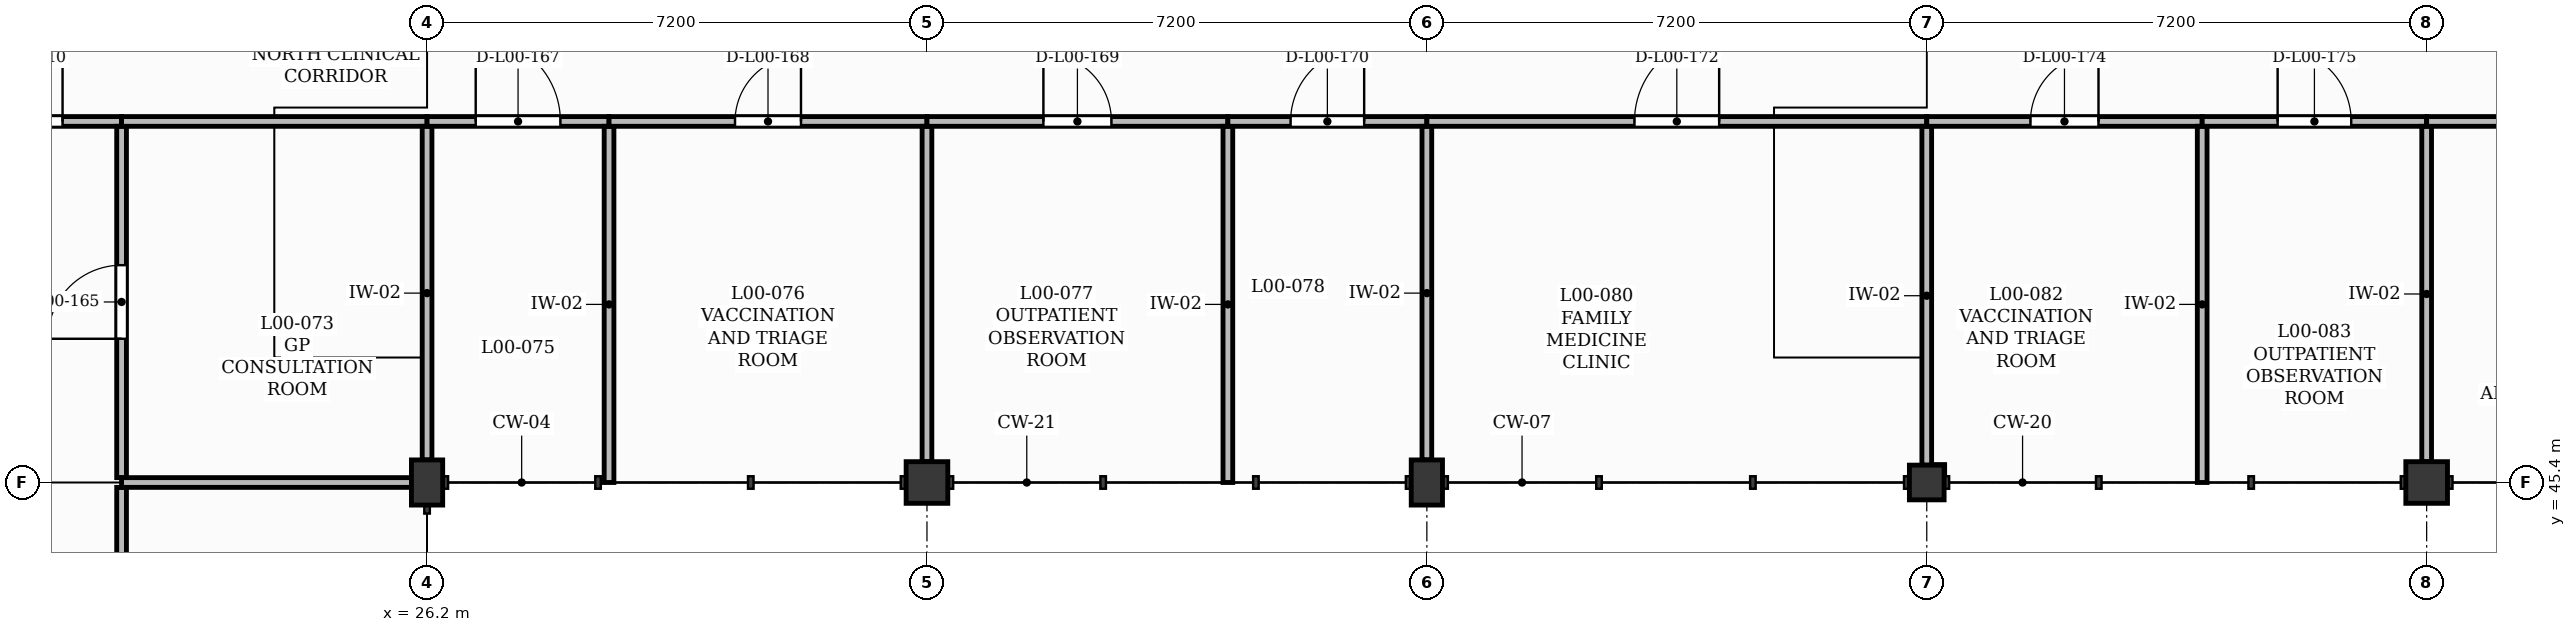
"""IFC4 building model, lengths in metres.
Left out: names, types, materials, properties, quantities, classifications, styles, units other than length and angle.
Written with IfcOpenShell. Run it as: python <this file> out.ifc"""

import sys

from ifc_helpers import new_model, si_unit, direction, frame, frame_2d, origin, origin_2d, place, context, subcontext, project, spatial, rectangle, extrude, element, fill, save


model = new_model("IFC4")
c1 = context("Model", 3, precision=1e-05, world=origin(), true_north=direction((0.0, 1.0)))
c2 = subcontext(c1, "Body", "Model", "MODEL_VIEW")
j1 = project(units=[si_unit("LENGTHUNIT", "METRE"), si_unit("PLANEANGLEUNIT", "RADIAN")], contexts=[c1])
p1 = place(None, origin())
s1 = spatial("IfcSite", under=j1, at=p1, CompositionType="ELEMENT")
p2 = place(p1, origin())
s2 = spatial("IfcBuilding", under=s1, at=p2, CompositionType="ELEMENT")
p3 = place(p2, origin())
s3 = spatial("IfcBuildingStorey", under=s2, at=p3, CompositionType="ELEMENT", Elevation=0.0)
p4 = place(p3, frame((26.2, 45.4, 0.0), z_axis=(0.0, 0.0, 1.0), x_axis=(1.0, 0.0, 0.0)))
e1 = element("IfcColumn", 1, at=p4, inside=s3, PredefinedType="COLUMN", context=c2, shape_type="SweptSolid", body=[
    extrude(rectangle(XDim=0.45, YDim=0.65, at=origin_2d()), origin(), (0.0, 0.0, 1.0), 4.2),
])
p5 = place(p3, frame((33.4, 45.4, 0.0), z_axis=(0.0, 0.0, 1.0), x_axis=(1.0, 0.0, 0.0)))
e2 = element("IfcColumn", 2, at=p5, inside=s3, PredefinedType="COLUMN", context=c2, shape_type="SweptSolid", body=[
    extrude(rectangle(XDim=0.6, YDim=0.6, at=origin_2d()), origin(), (0.0, 0.0, 1.0), 4.2),
])
p6 = place(p3, frame((40.6, 45.4, 0.0), z_axis=(0.0, 0.0, 1.0), x_axis=(1.0, 0.0, 0.0)))
e3 = element("IfcColumn", 3, at=p6, inside=s3, PredefinedType="COLUMN", context=c2, shape_type="SweptSolid", body=[
    extrude(rectangle(XDim=0.45, YDim=0.65, at=origin_2d()), origin(), (0.0, 0.0, 1.0), 4.2),
])
p7 = place(p3, frame((47.8, 45.4, 0.0), z_axis=(0.0, 0.0, 1.0), x_axis=(1.0, 0.0, 0.0)))
e4 = element("IfcColumn", 4, at=p7, inside=s3, PredefinedType="COLUMN", context=c2, shape_type="SweptSolid", body=[
    extrude(rectangle(XDim=0.5, YDim=0.5, at=origin_2d()), origin(), (0.0, 0.0, 1.0), 4.2),
])
p8 = place(p3, frame((55.0, 45.4, 0.0), z_axis=(0.0, 0.0, 1.0), x_axis=(1.0, 0.0, 0.0)))
e5 = element("IfcColumn", 5, at=p8, inside=s3, PredefinedType="COLUMN", context=c2, shape_type="SweptSolid", body=[
    extrude(rectangle(XDim=0.6, YDim=0.6, at=origin_2d()), origin(), (0.0, 0.0, 1.0), 4.2),
])
p9 = place(p3, frame((19.0, 50.6, 0.0), z_axis=(0.0, 0.0, 1.0), x_axis=(1.0, 0.0, 0.0)))
e6 = element("IfcWall", 6, at=p9, inside=s3, PredefinedType="PARTITIONING", context=c2, shape_type="SweptSolid", body=[
    extrude(rectangle(XDim=2.8, YDim=0.14, at=frame_2d((1.4, 0.0))), origin(), (0.0, 0.0, 1.0), 4.18),
])
p10 = place(p9, frame((0.85, 0.0, 0.0)))
e7 = element("IfcOpeningElement", 7, at=p10, cuts=e6, PredefinedType="OPENING", context=c2, shape_type="SweptSolid", body=[
    extrude(rectangle(XDim=1.1, YDim=2.1, at=frame_2d((0.55, 1.05))), frame((0.0, 0.08, 0.0), z_axis=(0.0, -1.0, 0.0), x_axis=(1.0, 0.0, 0.0)), (0.0, 0.0, 1.0), 0.16),
])
p11 = place(p3, frame((21.8, 36.87, 0.0), z_axis=(0.0, 0.0, 1.0), x_axis=(0.0, 1.0, 0.0)))
e8 = element("IfcWall", 8, at=p11, inside=s3, PredefinedType="PARTITIONING", context=c2, shape_type="SweptSolid", body=[
    extrude(rectangle(XDim=8.46, YDim=0.14, at=frame_2d((4.23, 0.0))), origin(), (0.0, 0.0, 1.0), 4.18),
])
p12 = place(p11, frame((3.65, 0.0, 0.0)))
e9 = element("IfcOpeningElement", 9, at=p12, cuts=e8, PredefinedType="OPENING", context=c2, shape_type="SweptSolid", body=[
    extrude(rectangle(XDim=1.16, YDim=2.1, at=frame_2d((0.58, 1.05))), frame((0.0, 0.08, 0.0), z_axis=(0.0, -1.0, 0.0), x_axis=(1.0, 0.0, 0.0)), (0.0, 0.0, 1.0), 0.16),
])
p13 = place(p3, frame((21.8, 45.47, 0.0), z_axis=(0.0, 0.0, 1.0), x_axis=(0.0, 1.0, 0.0)))
e10 = element("IfcWall", 10, at=p13, inside=s3, PredefinedType="PARTITIONING", context=c2, shape_type="SweptSolid", body=[
    extrude(rectangle(XDim=5.06, YDim=0.14, at=frame_2d((2.53, 0.0))), origin(), (0.0, 0.0, 1.0), 4.18),
])
p14 = place(p13, frame((2.0, 0.0, 0.0)))
e11 = element("IfcOpeningElement", 11, at=p14, cuts=e10, PredefinedType="OPENING", context=c2, shape_type="SweptSolid", body=[
    extrude(rectangle(XDim=1.06, YDim=2.15, at=frame_2d((0.53, 1.075))), frame((0.0, 0.08, 0.0), z_axis=(0.0, -1.0, 0.0), x_axis=(1.0, 0.0, 0.0)), (0.0, 0.0, 1.0), 0.16),
])
p15 = place(p3, frame((21.8, 45.4, 0.0), z_axis=(0.0, 0.0, 1.0), x_axis=(1.0, 0.0, 0.0)))
e12 = element("IfcWall", 12, at=p15, inside=s3, PredefinedType="PARTITIONING", context=c2, shape_type="SweptSolid", body=[
    extrude(rectangle(XDim=4.175, YDim=0.14, at=frame_2d((2.087, 0.0))), origin(), (0.0, 0.0, 1.0), 3.25),
])
p16 = place(p3, frame((21.8, 50.6, 0.0), z_axis=(0.0, 0.0, 1.0), x_axis=(1.0, 0.0, 0.0)))
e13 = element("IfcWall", 13, at=p16, inside=s3, PredefinedType="PARTITIONING", context=c2, shape_type="SweptSolid", body=[
    extrude(rectangle(XDim=4.4, YDim=0.14, at=frame_2d((2.2, 0.0))), origin(), (0.0, 0.0, 1.0), 4.18),
])
p17 = place(p3, frame((26.2, 45.725, 0.0), z_axis=(0.0, 0.0, 1.0), x_axis=(0.0, 1.0, 0.0)))
e14 = element("IfcWall", 14, at=p17, inside=s3, PredefinedType="PARTITIONING", context=c2, shape_type="SweptSolid", body=[
    extrude(rectangle(XDim=4.805, YDim=0.14, at=frame_2d((2.402, 0.0))), origin(), (0.0, 0.0, 1.0), 3.5),
])
p18 = place(p3, frame((26.2, 50.6, 0.0), z_axis=(0.0, 0.0, 1.0), x_axis=(1.0, 0.0, 0.0)))
e15 = element("IfcWall", 15, at=p18, inside=s3, PredefinedType="PARTITIONING", context=c2, shape_type="SweptSolid", body=[
    extrude(rectangle(XDim=2.621, YDim=0.14, at=frame_2d((1.311, 0.0))), origin(), (0.0, 0.0, 1.0), 4.18),
])
p19 = place(p18, frame((0.7, 0.0, 0.0)))
e16 = element("IfcOpeningElement", 16, at=p19, cuts=e15, PredefinedType="OPENING", context=c2, shape_type="SweptSolid", body=[
    extrude(rectangle(XDim=1.22, YDim=2.1, at=frame_2d((0.61, 1.05))), frame((0.0, 0.08, 0.0), z_axis=(0.0, -1.0, 0.0), x_axis=(1.0, 0.0, 0.0)), (0.0, 0.0, 1.0), 0.16),
])
p20 = place(p3, frame((28.821, 45.4, 0.0), z_axis=(0.0, 0.0, 1.0), x_axis=(0.0, 1.0, 0.0)))
e17 = element("IfcWall", 17, at=p20, inside=s3, PredefinedType="PARTITIONING", context=c2, shape_type="SweptSolid", body=[
    extrude(rectangle(XDim=5.13, YDim=0.14, at=frame_2d((2.565, 0.0))), origin(), (0.0, 0.0, 1.0), 4.18),
])
p21 = place(p3, frame((28.821, 50.6, 0.0), z_axis=(0.0, 0.0, 1.0), x_axis=(1.0, 0.0, 0.0)))
e18 = element("IfcWall", 18, at=p21, inside=s3, PredefinedType="PARTITIONING", context=c2, shape_type="SweptSolid", body=[
    extrude(rectangle(XDim=4.579, YDim=0.14, at=frame_2d((2.29, 0.0))), origin(), (0.0, 0.0, 1.0), 4.18),
])
p22 = place(p21, frame((1.814, 0.0, 0.0)))
e19 = element("IfcOpeningElement", 19, at=p22, cuts=e18, PredefinedType="OPENING", context=c2, shape_type="SweptSolid", body=[
    extrude(rectangle(XDim=0.95, YDim=2.1, at=frame_2d((0.475, 1.05))), frame((0.0, 0.08, 0.0), z_axis=(0.0, -1.0, 0.0), x_axis=(1.0, 0.0, 0.0)), (0.0, 0.0, 1.0), 0.16),
])
p23 = place(p3, frame((33.4, 45.7, 0.0), z_axis=(0.0, 0.0, 1.0), x_axis=(0.0, 1.0, 0.0)))
e20 = element("IfcWall", 20, at=p23, inside=s3, PredefinedType="PARTITIONING", context=c2, shape_type="SweptSolid", body=[
    extrude(rectangle(XDim=4.83, YDim=0.14, at=frame_2d((2.415, 0.0))), origin(), (0.0, 0.0, 1.0), 3.5),
])
p24 = place(p3, frame((33.4, 50.6, 0.0), z_axis=(0.0, 0.0, 1.0), x_axis=(1.0, 0.0, 0.0)))
e21 = element("IfcWall", 21, at=p24, inside=s3, PredefinedType="PARTITIONING", context=c2, shape_type="SweptSolid", body=[
    extrude(rectangle(XDim=4.334, YDim=0.14, at=frame_2d((2.167, 0.0))), origin(), (0.0, 0.0, 1.0), 4.18),
])
p25 = place(p24, frame((1.677, 0.0, 0.0)))
e22 = element("IfcOpeningElement", 22, at=p25, cuts=e21, PredefinedType="OPENING", context=c2, shape_type="SweptSolid", body=[
    extrude(rectangle(XDim=0.98, YDim=2.15, at=frame_2d((0.49, 1.075))), frame((0.0, 0.08, 0.0), z_axis=(0.0, -1.0, 0.0), x_axis=(1.0, 0.0, 0.0)), (0.0, 0.0, 1.0), 0.16),
])
p26 = place(p3, frame((37.734, 45.4, 0.0), z_axis=(0.0, 0.0, 1.0), x_axis=(0.0, 1.0, 0.0)))
e23 = element("IfcWall", 23, at=p26, inside=s3, PredefinedType="PARTITIONING", context=c2, shape_type="SweptSolid", body=[
    extrude(rectangle(XDim=5.13, YDim=0.14, at=frame_2d((2.565, 0.0))), origin(), (0.0, 0.0, 1.0), 4.18),
])
p27 = place(p3, frame((37.734, 50.6, 0.0), z_axis=(0.0, 0.0, 1.0), x_axis=(1.0, 0.0, 0.0)))
e24 = element("IfcWall", 24, at=p27, inside=s3, PredefinedType="PARTITIONING", context=c2, shape_type="SweptSolid", body=[
    extrude(rectangle(XDim=2.866, YDim=0.14, at=frame_2d((1.433, 0.0))), origin(), (0.0, 0.0, 1.0), 4.18),
])
p28 = place(p27, frame((0.903, 0.0, 0.0)))
e25 = element("IfcOpeningElement", 25, at=p28, cuts=e24, PredefinedType="OPENING", context=c2, shape_type="SweptSolid", body=[
    extrude(rectangle(XDim=1.06, YDim=2.15, at=frame_2d((0.53, 1.075))), frame((0.0, 0.08, 0.0), z_axis=(0.0, -1.0, 0.0), x_axis=(1.0, 0.0, 0.0)), (0.0, 0.0, 1.0), 0.16),
])
p29 = place(p3, frame((40.6, 45.725, 0.0), z_axis=(0.0, 0.0, 1.0), x_axis=(0.0, 1.0, 0.0)))
e26 = element("IfcWall", 26, at=p29, inside=s3, PredefinedType="PARTITIONING", context=c2, shape_type="SweptSolid", body=[
    extrude(rectangle(XDim=4.805, YDim=0.14, at=frame_2d((2.402, 0.0))), origin(), (0.0, 0.0, 1.0), 3.5),
])
p30 = place(p3, frame((40.6, 50.6, 0.0), z_axis=(0.0, 0.0, 1.0), x_axis=(1.0, 0.0, 0.0)))
e27 = element("IfcWall", 27, at=p30, inside=s3, PredefinedType="PARTITIONING", context=c2, shape_type="SweptSolid", body=[
    extrude(rectangle(XDim=7.2, YDim=0.14, at=frame_2d((3.6, 0.0))), origin(), (0.0, 0.0, 1.0), 4.18),
])
p31 = place(p30, frame((2.99, 0.0, 0.0)))
e28 = element("IfcOpeningElement", 28, at=p31, cuts=e27, PredefinedType="OPENING", context=c2, shape_type="SweptSolid", body=[
    extrude(rectangle(XDim=1.22, YDim=2.1, at=frame_2d((0.61, 1.05))), frame((0.0, 0.08, 0.0), z_axis=(0.0, -1.0, 0.0), x_axis=(1.0, 0.0, 0.0)), (0.0, 0.0, 1.0), 0.16),
])
p32 = place(p3, frame((47.8, 45.65, 0.0), z_axis=(0.0, 0.0, 1.0), x_axis=(0.0, 1.0, 0.0)))
e29 = element("IfcWall", 29, at=p32, inside=s3, PredefinedType="PARTITIONING", context=c2, shape_type="SweptSolid", body=[
    extrude(rectangle(XDim=4.88, YDim=0.14, at=frame_2d((2.44, 0.0))), origin(), (0.0, 0.0, 1.0), 3.5),
])
p33 = place(p3, frame((47.8, 50.6, 0.0), z_axis=(0.0, 0.0, 1.0), x_axis=(1.0, 0.0, 0.0)))
e30 = element("IfcWall", 30, at=p33, inside=s3, PredefinedType="PARTITIONING", context=c2, shape_type="SweptSolid", body=[
    extrude(rectangle(XDim=3.967, YDim=0.14, at=frame_2d((1.983, 0.0))), origin(), (0.0, 0.0, 1.0), 4.18),
])
p34 = place(p33, frame((1.493, 0.0, 0.0)))
e31 = element("IfcOpeningElement", 31, at=p34, cuts=e30, PredefinedType="OPENING", context=c2, shape_type="SweptSolid", body=[
    extrude(rectangle(XDim=0.98, YDim=2.15, at=frame_2d((0.49, 1.075))), frame((0.0, 0.08, 0.0), z_axis=(0.0, -1.0, 0.0), x_axis=(1.0, 0.0, 0.0)), (0.0, 0.0, 1.0), 0.16),
])
p35 = place(p3, frame((51.767, 45.4, 0.0), z_axis=(0.0, 0.0, 1.0), x_axis=(0.0, 1.0, 0.0)))
e32 = element("IfcWall", 32, at=p35, inside=s3, PredefinedType="PARTITIONING", context=c2, shape_type="SweptSolid", body=[
    extrude(rectangle(XDim=5.13, YDim=0.14, at=frame_2d((2.565, 0.0))), origin(), (0.0, 0.0, 1.0), 4.18),
])
p36 = place(p3, frame((51.767, 50.6, 0.0), z_axis=(0.0, 0.0, 1.0), x_axis=(1.0, 0.0, 0.0)))
e33 = element("IfcWall", 33, at=p36, inside=s3, PredefinedType="PARTITIONING", context=c2, shape_type="SweptSolid", body=[
    extrude(rectangle(XDim=3.233, YDim=0.14, at=frame_2d((1.616, 0.0))), origin(), (0.0, 0.0, 1.0), 4.18),
])
p37 = place(p36, frame((1.086, 0.0, 0.0)))
e34 = element("IfcOpeningElement", 34, at=p37, cuts=e33, PredefinedType="OPENING", context=c2, shape_type="SweptSolid", body=[
    extrude(rectangle(XDim=1.06, YDim=2.15, at=frame_2d((0.53, 1.075))), frame((0.0, 0.08, 0.0), z_axis=(0.0, -1.0, 0.0), x_axis=(1.0, 0.0, 0.0)), (0.0, 0.0, 1.0), 0.16),
])
p38 = place(p3, frame((55.0, 45.7, 0.0), z_axis=(0.0, 0.0, 1.0), x_axis=(0.0, 1.0, 0.0)))
e35 = element("IfcWall", 35, at=p38, inside=s3, PredefinedType="PARTITIONING", context=c2, shape_type="SweptSolid", body=[
    extrude(rectangle(XDim=4.83, YDim=0.14, at=frame_2d((2.415, 0.0))), origin(), (0.0, 0.0, 1.0), 3.5),
])
p39 = place(p3, frame((55.0, 50.6, 0.0), z_axis=(0.0, 0.0, 1.0), x_axis=(1.0, 0.0, 0.0)))
e36 = element("IfcWall", 36, at=p39, inside=s3, PredefinedType="PARTITIONING", context=c2, shape_type="SweptSolid", body=[
    extrude(rectangle(XDim=4.025, YDim=0.14, at=frame_2d((2.012, 0.0))), origin(), (0.0, 0.0, 1.0), 4.18),
])
p40 = place(p39, frame((1.242, 0.0, 0.0)))
e37 = element("IfcOpeningElement", 37, at=p40, cuts=e36, PredefinedType="OPENING", context=c2, shape_type="SweptSolid", body=[
    extrude(rectangle(XDim=1.54, YDim=2.25, at=frame_2d((0.77, 1.125))), frame((0.0, 0.08, 0.0), z_axis=(0.0, -1.0, 0.0), x_axis=(1.0, 0.0, 0.0)), (0.0, 0.0, 1.0), 0.16),
])
p41 = place(p10, origin())
e38 = element("IfcDoor", 38, at=p41, inside=s3, OperationType="SINGLE_SWING_RIGHT", PredefinedType="DOOR", context=c2, shape_type="SweptSolid", body=[
    extrude(rectangle(XDim=1.1, YDim=2.1, at=frame_2d((0.55, 1.05))), frame((0.0, 0.025, 0.0), z_axis=(0.0, -1.0, 0.0), x_axis=(1.0, 0.0, 0.0)), (0.0, 0.0, 1.0), 0.05),
])
fill(e7, e38)
p42 = place(p14, origin())
e39 = element("IfcDoor", 39, at=p42, inside=s3, OperationType="SINGLE_SWING_LEFT", PredefinedType="DOOR", context=c2, shape_type="SweptSolid", body=[
    extrude(rectangle(XDim=1.06, YDim=2.15, at=frame_2d((0.53, 1.075))), frame((0.0, 0.025, 0.0), z_axis=(0.0, -1.0, 0.0), x_axis=(1.0, 0.0, 0.0)), (0.0, 0.0, 1.0), 0.05),
])
fill(e11, e39)
p43 = place(p19, origin())
e40 = element("IfcDoor", 40, at=p43, inside=s3, OperationType="SINGLE_SWING_LEFT", PredefinedType="DOOR", context=c2, shape_type="SweptSolid", body=[
    extrude(rectangle(XDim=1.22, YDim=2.1, at=frame_2d((0.61, 1.05))), frame((0.0, 0.025, 0.0), z_axis=(0.0, -1.0, 0.0), x_axis=(1.0, 0.0, 0.0)), (0.0, 0.0, 1.0), 0.05),
])
fill(e16, e40)
p44 = place(p22, origin())
e41 = element("IfcDoor", 41, at=p44, inside=s3, OperationType="SINGLE_SWING_RIGHT", PredefinedType="DOOR", context=c2, shape_type="SweptSolid", body=[
    extrude(rectangle(XDim=0.95, YDim=2.1, at=frame_2d((0.475, 1.05))), frame((0.0, 0.025, 0.0), z_axis=(0.0, -1.0, 0.0), x_axis=(1.0, 0.0, 0.0)), (0.0, 0.0, 1.0), 0.05),
])
fill(e19, e41)
p45 = place(p25, origin())
e42 = element("IfcDoor", 42, at=p45, inside=s3, OperationType="SINGLE_SWING_LEFT", PredefinedType="DOOR", context=c2, shape_type="SweptSolid", body=[
    extrude(rectangle(XDim=0.98, YDim=2.15, at=frame_2d((0.49, 1.075))), frame((0.0, 0.025, 0.0), z_axis=(0.0, -1.0, 0.0), x_axis=(1.0, 0.0, 0.0)), (0.0, 0.0, 1.0), 0.05),
])
fill(e22, e42)
p46 = place(p28, origin())
e43 = element("IfcDoor", 43, at=p46, inside=s3, OperationType="SINGLE_SWING_RIGHT", PredefinedType="DOOR", context=c2, shape_type="SweptSolid", body=[
    extrude(rectangle(XDim=1.06, YDim=2.15, at=frame_2d((0.53, 1.075))), frame((0.0, 0.025, 0.0), z_axis=(0.0, -1.0, 0.0), x_axis=(1.0, 0.0, 0.0)), (0.0, 0.0, 1.0), 0.05),
])
fill(e25, e43)
p47 = place(p31, origin())
e44 = element("IfcDoor", 44, at=p47, inside=s3, OperationType="SINGLE_SWING_RIGHT", PredefinedType="DOOR", context=c2, shape_type="SweptSolid", body=[
    extrude(rectangle(XDim=1.22, YDim=2.1, at=frame_2d((0.61, 1.05))), frame((0.0, 0.025, 0.0), z_axis=(0.0, -1.0, 0.0), x_axis=(1.0, 0.0, 0.0)), (0.0, 0.0, 1.0), 0.05),
])
fill(e28, e44)
p48 = place(p34, origin())
e45 = element("IfcDoor", 45, at=p48, inside=s3, OperationType="SINGLE_SWING_RIGHT", PredefinedType="DOOR", context=c2, shape_type="SweptSolid", body=[
    extrude(rectangle(XDim=0.98, YDim=2.15, at=frame_2d((0.49, 1.075))), frame((0.0, 0.025, 0.0), z_axis=(0.0, -1.0, 0.0), x_axis=(1.0, 0.0, 0.0)), (0.0, 0.0, 1.0), 0.05),
])
fill(e31, e45)
p49 = place(p37, origin())
e46 = element("IfcDoor", 46, at=p49, inside=s3, OperationType="SINGLE_SWING_LEFT", PredefinedType="DOOR", context=c2, shape_type="SweptSolid", body=[
    extrude(rectangle(XDim=1.06, YDim=2.15, at=frame_2d((0.53, 1.075))), frame((0.0, 0.025, 0.0), z_axis=(0.0, -1.0, 0.0), x_axis=(1.0, 0.0, 0.0)), (0.0, 0.0, 1.0), 0.05),
])
fill(e34, e46)
save(model, sys.argv[1])
